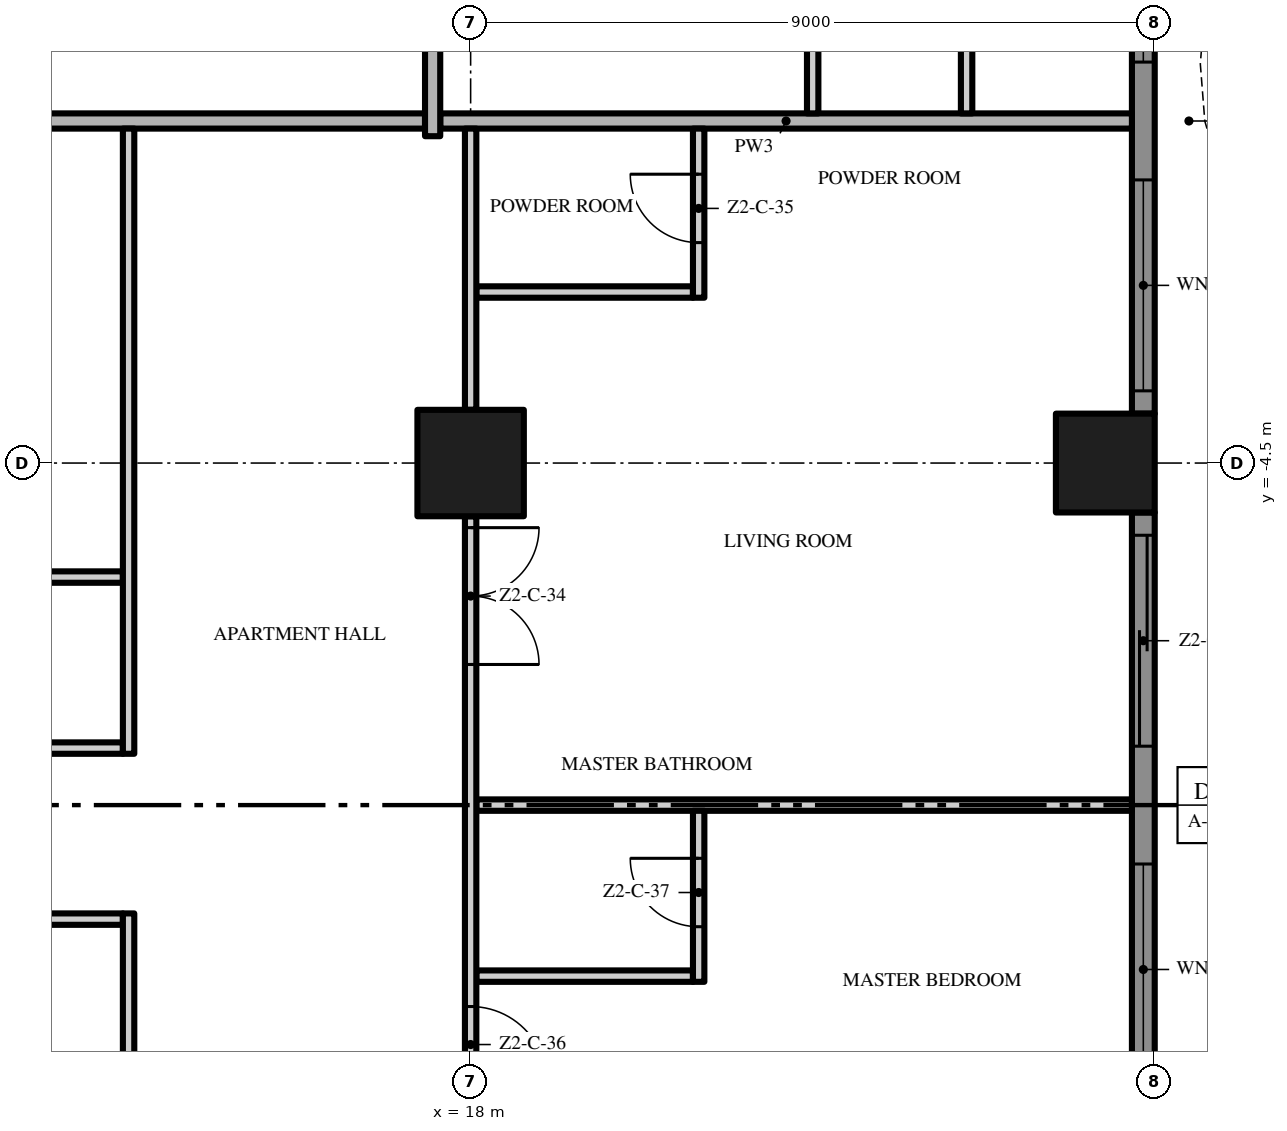
"""IFC4 building model, lengths in metres.
Left out: names, types, materials, properties, quantities, classifications, styles, units other than length and angle.
Written with IfcOpenShell. Run it as: python <this file> out.ifc"""

import sys

from ifc_helpers import new_model, si_unit, direction, frame, frame_2d, origin, origin_2d, place, context, subcontext, project, spatial, polyline, rectangle, outline, extrude, element, fill, save


model = new_model("IFC4")
c1 = context("Model", 3, precision=1e-05, world=origin(), true_north=direction((0.0, 1.0)))
c2 = subcontext(c1, "Body", "Model", "MODEL_VIEW")
j1 = project(units=[si_unit("LENGTHUNIT", "METRE"), si_unit("PLANEANGLEUNIT", "RADIAN")], contexts=[c1])
p1 = place(None, origin())
s1 = spatial("IfcSite", under=j1, at=p1, CompositionType="ELEMENT")
p2 = place(p1, origin())
s2 = spatial("IfcBuilding", under=s1, at=p2, CompositionType="ELEMENT")
p3 = place(p2, frame((0.0, 0.0, 92.2)))
s3 = spatial("IfcBuildingStorey", under=s2, at=p3, CompositionType="ELEMENT", Elevation=92.2)
p4 = place(p3, frame((18.0, -4.5, 0.0), z_axis=(0.0, 0.0, 1.0), x_axis=(1.0, 0.0, 0.0)))
e1 = element("IfcColumn", 1, at=p4, inside=s3, PredefinedType="COLUMN", context=c2, shape_type="SweptSolid", body=[
    extrude(rectangle(XDim=1.4, YDim=1.4, at=origin_2d()), origin(), (0.0, 0.0, 1.0), 3.5),
])
p5 = place(p3, frame((26.35, -4.5, 0.0), z_axis=(0.0, 0.0, 1.0), x_axis=(1.0, 0.0, 0.0)))
e2 = element("IfcColumn", 2, at=p5, inside=s3, PredefinedType="COLUMN", context=c2, shape_type="SweptSolid", body=[
    extrude(rectangle(XDim=1.3, YDim=1.3, at=origin_2d()), origin(), (0.0, 0.0, 1.0), 3.5),
])
p6 = place(p3, frame((26.85, -5.15, 0.0), z_axis=(0.0, 0.0, 1.0), x_axis=(0.0, -1.0, 0.0)))
e3 = element("IfcWall", 3, at=p6, inside=s3, PredefinedType="SOLIDWALL", context=c2, shape_type="SweptSolid", body=[
    extrude(rectangle(XDim=7.7, YDim=0.3, at=frame_2d((3.85, 0.0))), origin(), (0.0, 0.0, 1.0), 3.5),
])
p7 = place(p6, frame((4.625, 0.0, 0.45)))
e4 = element("IfcOpeningElement", 4, at=p7, cuts=e3, PredefinedType="OPENING", context=c2, shape_type="SweptSolid", body=[
    extrude(rectangle(XDim=2.775, YDim=2.65, at=frame_2d((1.387, 1.325))), frame((0.0, 0.16, 0.0), z_axis=(0.0, -1.0, 0.0), x_axis=(1.0, 0.0, 0.0)), (0.0, 0.0, 1.0), 0.32),
])
p8 = place(p6, frame((0.3, 0.0, 0.0)))
e5 = element("IfcOpeningElement", 5, at=p8, cuts=e3, PredefinedType="OPENING", context=c2, shape_type="SweptSolid", body=[
    extrude(rectangle(XDim=2.775, YDim=2.4, at=frame_2d((1.387, 1.2))), frame((0.0, 0.16, 0.0), z_axis=(0.0, -1.0, 0.0), x_axis=(1.0, 0.0, 0.0)), (0.0, 0.0, 1.0), 0.32),
])
p9 = place(p3, frame((26.85, 3.85, 0.0), z_axis=(0.0, 0.0, 1.0), x_axis=(0.0, -1.0, 0.0)))
e6 = element("IfcWall", 6, at=p9, inside=s3, PredefinedType="SOLIDWALL", context=c2, shape_type="SweptSolid", body=[
    extrude(rectangle(XDim=7.7, YDim=0.3, at=frame_2d((3.85, 0.0))), origin(), (0.0, 0.0, 1.0), 3.5),
])
p10 = place(p9, frame((4.625, 0.0, 0.45)))
e7 = element("IfcOpeningElement", 7, at=p10, cuts=e6, PredefinedType="OPENING", context=c2, shape_type="SweptSolid", body=[
    extrude(rectangle(XDim=2.775, YDim=2.65, at=frame_2d((1.387, 1.325))), frame((0.0, 0.16, 0.0), z_axis=(0.0, -1.0, 0.0), x_axis=(1.0, 0.0, 0.0)), (0.0, 0.0, 1.0), 0.32),
])
p11 = place(p9, frame((0.3, 0.0, 0.45)))
e8 = element("IfcOpeningElement", 8, at=p11, cuts=e6, PredefinedType="OPENING", context=c2, shape_type="SweptSolid", body=[
    extrude(rectangle(XDim=2.775, YDim=2.65, at=frame_2d((1.387, 1.325))), frame((0.0, 0.16, 0.0), z_axis=(0.0, -1.0, 0.0), x_axis=(1.0, 0.0, 0.0)), (0.0, 0.0, 1.0), 0.32),
])
p12 = place(p3, origin())
e9 = element("IfcWall", 9, at=p12, inside=s3, PredefinedType="USERDEFINED", context=c2, shape_type="SweptSolid", body=[
    extrude(outline(polyline([(28.8, -18.0), (28.095, -16.5), (27.659, -15.0), (27.6, -14.25), (27.659, -13.5), (28.095, -12.0), (28.8, -10.5), (29.505, -9.0), (29.941, -7.5), (30.0, -6.75), (29.941, -6.0), (29.505, -4.5), (28.8, -3.0), (28.095, -1.5), (27.659, 0.0), (27.6, 0.75), (27.659, 1.5), (28.095, 3.0), (28.8, 4.5), (29.505, 6.0), (29.941, 7.5), (30.0, 8.25), (29.941, 9.0), (29.505, 10.5), (28.8, 12.0), (28.095, 13.5), (27.659, 15.0), (27.6, 15.75), (27.659, 16.5), (28.095, 18.0), (27.855, 18.07), (27.411, 16.545), (27.349, 15.75), (27.411, 14.955), (27.86, 13.411), (28.574, 11.894), (29.271, 10.411), (29.694, 8.955), (29.749, 8.25), (29.694, 7.545), (29.271, 6.089), (28.574, 4.606), (27.86, 3.089), (27.411, 1.545), (27.349, 0.75), (27.411, -0.045), (27.86, -1.589), (28.574, -3.106), (29.271, -4.589), (29.694, -6.045), (29.749, -6.75), (29.694, -7.455), (29.271, -8.911), (28.574, -10.394), (27.86, -11.911), (27.411, -13.455), (27.349, -14.25), (27.411, -15.045), (27.86, -16.589), (28.574, -18.106), (28.8, -18.0)])), origin(), (0.0, 0.0, 1.0), 0.9),
])
p13 = place(p3, frame((18.075, -11.25, 0.0), z_axis=(0.0, 0.0, 1.0), x_axis=(1.0, 0.0, 0.0)))
e10 = element("IfcWall", 10, at=p13, inside=s3, PredefinedType="PARTITIONING", context=c2, shape_type="SweptSolid", body=[
    extrude(rectangle(XDim=2.85, YDim=0.15, at=frame_2d((1.425, 0.0))), origin(), (0.0, 0.0, 1.0), 3.5),
])
p14 = place(p3, frame((9.075, -10.5, 0.0), z_axis=(0.0, 0.0, 1.0), x_axis=(1.0, 0.0, 0.0)))
e11 = element("IfcWall", 11, at=p14, inside=s3, PredefinedType="PARTITIONING", context=c2, shape_type="SweptSolid", body=[
    extrude(rectangle(XDim=4.35, YDim=0.15, at=frame_2d((2.175, 0.0))), origin(), (0.0, 0.0, 1.0), 3.5),
])
p15 = place(p3, frame((18.075, -9.0, 0.0), z_axis=(0.0, 0.0, 1.0), x_axis=(1.0, 0.0, 0.0)))
e12 = element("IfcWall", 12, at=p15, inside=s3, PredefinedType="PARTITIONING", context=c2, shape_type="SweptSolid", body=[
    extrude(rectangle(XDim=8.625, YDim=0.15, at=frame_2d((4.312, 0.0))), origin(), (0.0, 0.0, 1.0), 3.5),
])
p16 = place(p3, frame((9.075, -8.25, 0.0), z_axis=(0.0, 0.0, 1.0), x_axis=(1.0, 0.0, 0.0)))
e13 = element("IfcWall", 13, at=p16, inside=s3, PredefinedType="PARTITIONING", context=c2, shape_type="SweptSolid", body=[
    extrude(rectangle(XDim=4.35, YDim=0.15, at=frame_2d((2.175, 0.0))), origin(), (0.0, 0.0, 1.0), 3.5),
])
p17 = place(p16, frame((1.75, 0.0, 0.0)))
e14 = element("IfcOpeningElement", 14, at=p17, cuts=e13, PredefinedType="OPENING", context=c2, shape_type="SweptSolid", body=[
    extrude(rectangle(XDim=0.9, YDim=2.1, at=frame_2d((0.45, 1.05))), frame((0.0, 0.085, 0.0), z_axis=(0.0, -1.0, 0.0), x_axis=(1.0, 0.0, 0.0)), (0.0, 0.0, 1.0), 0.17),
])
p18 = place(p3, frame((9.075, -6.0, 0.0), z_axis=(0.0, 0.0, 1.0), x_axis=(1.0, 0.0, 0.0)))
e15 = element("IfcWall", 15, at=p18, inside=s3, PredefinedType="PARTITIONING", context=c2, shape_type="SweptSolid", body=[
    extrude(rectangle(XDim=4.35, YDim=0.15, at=frame_2d((2.175, 0.0))), origin(), (0.0, 0.0, 1.0), 3.5),
])
p19 = place(p3, frame((18.075, -2.25, 0.0), z_axis=(0.0, 0.0, 1.0), x_axis=(1.0, 0.0, 0.0)))
e16 = element("IfcWall", 16, at=p19, inside=s3, PredefinedType="PARTITIONING", context=c2, shape_type="SweptSolid", body=[
    extrude(rectangle(XDim=2.85, YDim=0.15, at=frame_2d((1.425, 0.0))), origin(), (0.0, 0.0, 1.0), 3.5),
])
p20 = place(p3, frame((4.6, 0.0, 0.0), z_axis=(0.0, 0.0, 1.0), x_axis=(1.0, 0.0, 0.0)))
e17 = element("IfcWall", 17, at=p20, inside=s3, PredefinedType="PARTITIONING", context=c2, shape_type="SweptSolid", body=[
    extrude(rectangle(XDim=12.8, YDim=0.2, at=frame_2d((6.4, 0.0))), origin(), (0.0, 0.0, 1.0), 3.5),
])
p21 = place(p3, frame((17.6, 0.0, 0.0), z_axis=(0.0, 0.0, 1.0), x_axis=(1.0, 0.0, 0.0)))
e18 = element("IfcWall", 18, at=p21, inside=s3, PredefinedType="PARTITIONING", context=c2, shape_type="SweptSolid", body=[
    extrude(rectangle(XDim=9.1, YDim=0.2, at=frame_2d((4.55, 0.0))), origin(), (0.0, 0.0, 1.0), 3.5),
])
p22 = place(p3, frame((13.5, -22.2, 0.0), z_axis=(0.0, 0.0, 1.0), x_axis=(0.0, 1.0, 0.0)))
e19 = element("IfcWall", 19, at=p22, inside=s3, PredefinedType="PARTITIONING", context=c2, shape_type="SweptSolid", body=[
    extrude(rectangle(XDim=11.775, YDim=0.15, at=frame_2d((5.888, 0.0))), origin(), (0.0, 0.0, 1.0), 3.5),
])
p23 = place(p22, frame((8.25, 0.0, 0.0)))
e20 = element("IfcOpeningElement", 20, at=p23, cuts=e19, PredefinedType="OPENING", context=c2, shape_type="SweptSolid", body=[
    extrude(rectangle(XDim=0.9, YDim=2.1, at=frame_2d((0.45, 1.05))), frame((0.0, 0.085, 0.0), z_axis=(0.0, -1.0, 0.0), x_axis=(1.0, 0.0, 0.0)), (0.0, 0.0, 1.0), 0.17),
])
p24 = place(p3, frame((13.5, -8.325, 0.0), z_axis=(0.0, 0.0, 1.0), x_axis=(0.0, 1.0, 0.0)))
e21 = element("IfcWall", 21, at=p24, inside=s3, PredefinedType="PARTITIONING", context=c2, shape_type="SweptSolid", body=[
    extrude(rectangle(XDim=8.225, YDim=0.15, at=frame_2d((4.112, 0.0))), origin(), (0.0, 0.0, 1.0), 3.5),
])
p25 = place(p3, frame((17.5, -0.2, 0.0), z_axis=(0.0, 0.0, 1.0), x_axis=(0.0, 1.0, 0.0)))
e22 = element("IfcWall", 22, at=p25, inside=s3, PredefinedType="PARTITIONING", context=c2, shape_type="SweptSolid", body=[
    extrude(rectangle(XDim=4.0, YDim=0.2, at=frame_2d((2.0, 0.0))), origin(), (0.0, 0.0, 1.0), 3.5),
])
p26 = place(p3, frame((18.0, -5.2, 0.0), z_axis=(0.0, 0.0, 1.0), x_axis=(0.0, -1.0, 0.0)))
e23 = element("IfcWall", 23, at=p26, inside=s3, PredefinedType="PARTITIONING", context=c2, shape_type="SweptSolid", body=[
    extrude(rectangle(XDim=7.6, YDim=0.15, at=frame_2d((3.8, 0.0))), origin(), (0.0, 0.0, 1.0), 3.5),
])
p27 = place(p26, frame((0.15, 0.0, 0.0)))
e24 = element("IfcOpeningElement", 24, at=p27, cuts=e23, PredefinedType="OPENING", context=c2, shape_type="SweptSolid", body=[
    extrude(rectangle(XDim=1.8, YDim=2.4, at=frame_2d((0.9, 1.2))), frame((0.0, 0.085, 0.0), z_axis=(0.0, -1.0, 0.0), x_axis=(1.0, 0.0, 0.0)), (0.0, 0.0, 1.0), 0.17),
])
p28 = place(p26, frame((6.45, 0.0, 0.0)))
e25 = element("IfcOpeningElement", 25, at=p28, cuts=e23, PredefinedType="OPENING", context=c2, shape_type="SweptSolid", body=[
    extrude(rectangle(XDim=1.0, YDim=2.4, at=frame_2d((0.5, 1.2))), frame((0.0, 0.085, 0.0), z_axis=(0.0, -1.0, 0.0), x_axis=(1.0, 0.0, 0.0)), (0.0, 0.0, 1.0), 0.17),
])
p29 = place(p3, frame((18.0, -3.8, 0.0), z_axis=(0.0, 0.0, 1.0), x_axis=(0.0, 1.0, 0.0)))
e26 = element("IfcWall", 26, at=p29, inside=s3, PredefinedType="PARTITIONING", context=c2, shape_type="SweptSolid", body=[
    extrude(rectangle(XDim=3.7, YDim=0.15, at=frame_2d((1.85, 0.0))), origin(), (0.0, 0.0, 1.0), 3.5),
])
p30 = place(p3, frame((21.0, -11.325, 0.0), z_axis=(0.0, 0.0, 1.0), x_axis=(0.0, 1.0, 0.0)))
e27 = element("IfcWall", 27, at=p30, inside=s3, PredefinedType="PARTITIONING", context=c2, shape_type="SweptSolid", body=[
    extrude(rectangle(XDim=2.25, YDim=0.15, at=frame_2d((1.125, 0.0))), origin(), (0.0, 0.0, 1.0), 3.5),
])
p31 = place(p30, frame((0.725, 0.0, 0.0)))
e28 = element("IfcOpeningElement", 28, at=p31, cuts=e27, PredefinedType="OPENING", context=c2, shape_type="SweptSolid", body=[
    extrude(rectangle(XDim=0.9, YDim=2.1, at=frame_2d((0.45, 1.05))), frame((0.0, 0.085, 0.0), z_axis=(0.0, -1.0, 0.0), x_axis=(1.0, 0.0, 0.0)), (0.0, 0.0, 1.0), 0.17),
])
p32 = place(p3, frame((21.0, -2.325, 0.0), z_axis=(0.0, 0.0, 1.0), x_axis=(0.0, 1.0, 0.0)))
e29 = element("IfcWall", 29, at=p32, inside=s3, PredefinedType="PARTITIONING", context=c2, shape_type="SweptSolid", body=[
    extrude(rectangle(XDim=2.225, YDim=0.15, at=frame_2d((1.113, 0.0))), origin(), (0.0, 0.0, 1.0), 3.5),
])
p33 = place(p32, frame((0.725, 0.0, 0.0)))
e30 = element("IfcOpeningElement", 30, at=p33, cuts=e29, PredefinedType="OPENING", context=c2, shape_type="SweptSolid", body=[
    extrude(rectangle(XDim=0.9, YDim=2.1, at=frame_2d((0.45, 1.05))), frame((0.0, 0.085, 0.0), z_axis=(0.0, -1.0, 0.0), x_axis=(1.0, 0.0, 0.0)), (0.0, 0.0, 1.0), 0.17),
])
p34 = place(p3, frame((22.5, 17.35, 0.0), z_axis=(0.0, 0.0, 1.0), x_axis=(0.0, -1.0, 0.0)))
e31 = element("IfcWall", 31, at=p34, inside=s3, PredefinedType="PARTITIONING", context=c2, shape_type="SweptSolid", body=[
    extrude(rectangle(XDim=17.25, YDim=0.15, at=frame_2d((8.625, 0.0))), origin(), (0.0, 0.0, 1.0), 3.5),
])
p35 = place(p34, frame((13.05, 0.0, 0.0)))
e32 = element("IfcOpeningElement", 32, at=p35, cuts=e31, PredefinedType="OPENING", context=c2, shape_type="SweptSolid", body=[
    extrude(rectangle(XDim=1.8, YDim=2.4, at=frame_2d((0.9, 1.2))), frame((0.0, 0.085, 0.0), z_axis=(0.0, -1.0, 0.0), x_axis=(1.0, 0.0, 0.0)), (0.0, 0.0, 1.0), 0.17),
])
p36 = place(p34, frame((5.6, 0.0, 0.0)))
e33 = element("IfcOpeningElement", 33, at=p36, cuts=e31, PredefinedType="OPENING", context=c2, shape_type="SweptSolid", body=[
    extrude(rectangle(XDim=1.0, YDim=2.4, at=frame_2d((0.5, 1.2))), frame((0.0, 0.085, 0.0), z_axis=(0.0, -1.0, 0.0), x_axis=(1.0, 0.0, 0.0)), (0.0, 0.0, 1.0), 0.17),
])
p37 = place(p3, frame((24.525, 0.1, 0.0), z_axis=(0.0, 0.0, 1.0), x_axis=(0.0, 1.0, 0.0)))
e34 = element("IfcWall", 34, at=p37, inside=s3, PredefinedType="PARTITIONING", context=c2, shape_type="SweptSolid", body=[
    extrude(rectangle(XDim=2.225, YDim=0.15, at=frame_2d((1.113, 0.0))), origin(), (0.0, 0.0, 1.0), 3.5),
])
p38 = place(p7, origin())
e35 = element("IfcWindow", 35, at=p38, inside=s3, PartitioningType="SINGLE_PANEL", PredefinedType="WINDOW", context=c2, shape_type="SweptSolid", body=[
    extrude(rectangle(XDim=2.775, YDim=2.65, at=frame_2d((1.387, 1.325))), frame((0.0, 0.03, 0.0), z_axis=(0.0, -1.0, 0.0), x_axis=(1.0, 0.0, 0.0)), (0.0, 0.0, 1.0), 0.06),
])
fill(e4, e35)
p39 = place(p8, origin())
e36 = element("IfcDoor", 36, at=p39, inside=s3, OperationType="SINGLE_SWING_LEFT", PredefinedType="DOOR", context=c2, shape_type="SweptSolid", body=[
    extrude(rectangle(XDim=2.775, YDim=2.4, at=frame_2d((1.387, 1.2))), frame((0.0, 0.025, 0.0), z_axis=(0.0, -1.0, 0.0), x_axis=(1.0, 0.0, 0.0)), (0.0, 0.0, 1.0), 0.05),
])
fill(e5, e36)
p40 = place(p10, origin())
e37 = element("IfcWindow", 37, at=p40, inside=s3, PartitioningType="SINGLE_PANEL", PredefinedType="WINDOW", context=c2, shape_type="SweptSolid", body=[
    extrude(rectangle(XDim=2.775, YDim=2.65, at=frame_2d((1.387, 1.325))), frame((0.0, 0.03, 0.0), z_axis=(0.0, -1.0, 0.0), x_axis=(1.0, 0.0, 0.0)), (0.0, 0.0, 1.0), 0.06),
])
fill(e7, e37)
p41 = place(p11, origin())
e38 = element("IfcWindow", 38, at=p41, inside=s3, PartitioningType="SINGLE_PANEL", PredefinedType="WINDOW", context=c2, shape_type="SweptSolid", body=[
    extrude(rectangle(XDim=2.775, YDim=2.65, at=frame_2d((1.387, 1.325))), frame((0.0, 0.03, 0.0), z_axis=(0.0, -1.0, 0.0), x_axis=(1.0, 0.0, 0.0)), (0.0, 0.0, 1.0), 0.06),
])
fill(e8, e38)
p42 = place(p27, origin())
e39 = element("IfcDoor", 39, at=p42, inside=s3, OperationType="DOUBLE_DOOR_SINGLE_SWING", PredefinedType="DOOR", context=c2, shape_type="SweptSolid", body=[
    extrude(rectangle(XDim=1.8, YDim=2.4, at=frame_2d((0.9, 1.2))), frame((0.0, 0.025, 0.0), z_axis=(0.0, -1.0, 0.0), x_axis=(1.0, 0.0, 0.0)), (0.0, 0.0, 1.0), 0.05),
])
fill(e24, e39)
p43 = place(p33, origin())
e40 = element("IfcDoor", 40, at=p43, inside=s3, OperationType="SINGLE_SWING_RIGHT", PredefinedType="DOOR", context=c2, shape_type="SweptSolid", body=[
    extrude(rectangle(XDim=0.9, YDim=2.1, at=frame_2d((0.45, 1.05))), frame((0.0, 0.025, 0.0), z_axis=(0.0, -1.0, 0.0), x_axis=(1.0, 0.0, 0.0)), (0.0, 0.0, 1.0), 0.05),
])
fill(e30, e40)
p44 = place(p28, origin())
e41 = element("IfcDoor", 41, at=p44, inside=s3, OperationType="SINGLE_SWING_RIGHT", PredefinedType="DOOR", context=c2, shape_type="SweptSolid", body=[
    extrude(rectangle(XDim=1.0, YDim=2.4, at=frame_2d((0.5, 1.2))), frame((0.0, 0.025, 0.0), z_axis=(0.0, -1.0, 0.0), x_axis=(1.0, 0.0, 0.0)), (0.0, 0.0, 1.0), 0.05),
])
fill(e25, e41)
p45 = place(p31, origin())
e42 = element("IfcDoor", 42, at=p45, inside=s3, OperationType="SINGLE_SWING_RIGHT", PredefinedType="DOOR", context=c2, shape_type="SweptSolid", body=[
    extrude(rectangle(XDim=0.9, YDim=2.1, at=frame_2d((0.45, 1.05))), frame((0.0, 0.025, 0.0), z_axis=(0.0, -1.0, 0.0), x_axis=(1.0, 0.0, 0.0)), (0.0, 0.0, 1.0), 0.05),
])
fill(e28, e42)
save(model, sys.argv[1])
